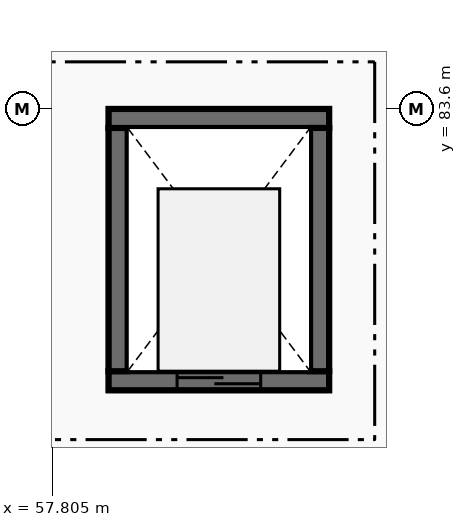
"""IFC4 building model, lengths in metres.
Left out: names, types, materials, properties, quantities, classifications, styles, units other than length and angle.
Written with IfcOpenShell. Run it as: python <this file> out.ifc"""

import sys

from ifc_helpers import new_model, si_unit, direction, frame, frame_2d, origin, place, context, subcontext, project, spatial, rectangle, extrude, element, fill, save


model = new_model("IFC4")
c1 = context("Model", 3, precision=1e-05, world=origin(), true_north=direction((0.0, 1.0)))
c2 = subcontext(c1, "Body", "Model", "MODEL_VIEW")
j1 = project(units=[si_unit("LENGTHUNIT", "METRE"), si_unit("PLANEANGLEUNIT", "RADIAN")], contexts=[c1])
p1 = place(None, origin())
s1 = spatial("IfcSite", under=j1, at=p1, CompositionType="ELEMENT")
p2 = place(p1, origin())
s2 = spatial("IfcBuilding", under=s1, at=p2, CompositionType="ELEMENT")
p3 = place(p2, frame((0.0, 0.0, -4.5)))
s3 = spatial("IfcBuildingStorey", under=s2, at=p3, CompositionType="ELEMENT", Elevation=-4.5)
p4 = place(p3, frame((61.45, 80.025, -1.35), z_axis=(0.0, 0.0, 1.0), x_axis=(-1.0, 0.0, 0.0)))
e1 = element("IfcWall", 1, at=p4, inside=s3, PredefinedType="SHEAR", context=c2, shape_type="SweptSolid", body=[
    extrude(rectangle(XDim=2.9, YDim=0.25, at=frame_2d((1.45, 0.0))), origin(), (0.0, 0.0, 1.0), 1.35),
])
p5 = place(p3, frame((58.675, 80.15, -1.35), z_axis=(0.0, 0.0, 1.0), x_axis=(0.0, 1.0, 0.0)))
e2 = element("IfcWall", 2, at=p5, inside=s3, PredefinedType="SHEAR", context=c2, shape_type="SweptSolid", body=[
    extrude(rectangle(XDim=3.2, YDim=0.25, at=frame_2d((1.6, 0.0))), origin(), (0.0, 0.0, 1.0), 1.35),
])
p6 = place(p3, frame((58.55, 83.475, -1.35), z_axis=(0.0, 0.0, 1.0), x_axis=(1.0, 0.0, 0.0)))
e3 = element("IfcWall", 3, at=p6, inside=s3, PredefinedType="SHEAR", context=c2, shape_type="SweptSolid", body=[
    extrude(rectangle(XDim=2.9, YDim=0.25, at=frame_2d((1.45, 0.0))), origin(), (0.0, 0.0, 1.0), 1.35),
])
p7 = place(p3, frame((61.325, 83.35, -1.35), z_axis=(0.0, 0.0, 1.0), x_axis=(0.0, -1.0, 0.0)))
e4 = element("IfcWall", 4, at=p7, inside=s3, PredefinedType="SHEAR", context=c2, shape_type="SweptSolid", body=[
    extrude(rectangle(XDim=3.2, YDim=0.25, at=frame_2d((1.6, 0.0))), origin(), (0.0, 0.0, 1.0), 1.35),
])
p8 = place(p3, frame((61.45, 80.025, 0.0), z_axis=(0.0, 0.0, 1.0), x_axis=(-1.0, 0.0, 0.0)))
e5 = element("IfcWall", 5, at=p8, inside=s3, PredefinedType="SHEAR", context=c2, shape_type="SweptSolid", body=[
    extrude(rectangle(XDim=2.9, YDim=0.25, at=frame_2d((1.45, 0.0))), origin(), (0.0, 0.0, 1.0), 4.5),
])
p9 = place(p8, frame((0.9, 0.0, 0.0)))
e6 = element("IfcOpeningElement", 6, at=p9, cuts=e5, PredefinedType="OPENING", context=c2, shape_type="SweptSolid", body=[
    extrude(rectangle(XDim=1.1, YDim=2.15, at=frame_2d((0.55, 1.075))), frame((0.0, 0.135, 0.0), z_axis=(0.0, -1.0, 0.0), x_axis=(1.0, 0.0, 0.0)), (0.0, 0.0, 1.0), 0.27),
])
p10 = place(p3, frame((58.675, 80.15, 0.0), z_axis=(0.0, 0.0, 1.0), x_axis=(0.0, 1.0, 0.0)))
e7 = element("IfcWall", 7, at=p10, inside=s3, PredefinedType="SHEAR", context=c2, shape_type="SweptSolid", body=[
    extrude(rectangle(XDim=3.2, YDim=0.25, at=frame_2d((1.6, 0.0))), origin(), (0.0, 0.0, 1.0), 4.5),
])
p11 = place(p3, frame((58.55, 83.475, 0.0), z_axis=(0.0, 0.0, 1.0), x_axis=(1.0, 0.0, 0.0)))
e8 = element("IfcWall", 8, at=p11, inside=s3, PredefinedType="SHEAR", context=c2, shape_type="SweptSolid", body=[
    extrude(rectangle(XDim=2.9, YDim=0.25, at=frame_2d((1.45, 0.0))), origin(), (0.0, 0.0, 1.0), 4.5),
])
p12 = place(p3, frame((61.325, 83.35, 0.0), z_axis=(0.0, 0.0, 1.0), x_axis=(0.0, -1.0, 0.0)))
e9 = element("IfcWall", 9, at=p12, inside=s3, PredefinedType="SHEAR", context=c2, shape_type="SweptSolid", body=[
    extrude(rectangle(XDim=3.2, YDim=0.25, at=frame_2d((1.6, 0.0))), origin(), (0.0, 0.0, 1.0), 4.5),
])
p13 = place(p9, origin())
e10 = element("IfcDoor", 10, at=p13, inside=s3, OperationType="DOUBLE_DOOR_SLIDING", PredefinedType="DOOR", context=c2, shape_type="SweptSolid", body=[
    extrude(rectangle(XDim=1.1, YDim=2.15, at=frame_2d((0.55, 1.075))), frame((0.0, 0.025, 0.0), z_axis=(0.0, -1.0, 0.0), x_axis=(1.0, 0.0, 0.0)), (0.0, 0.0, 1.0), 0.05),
])
fill(e6, e10)
save(model, sys.argv[1])
